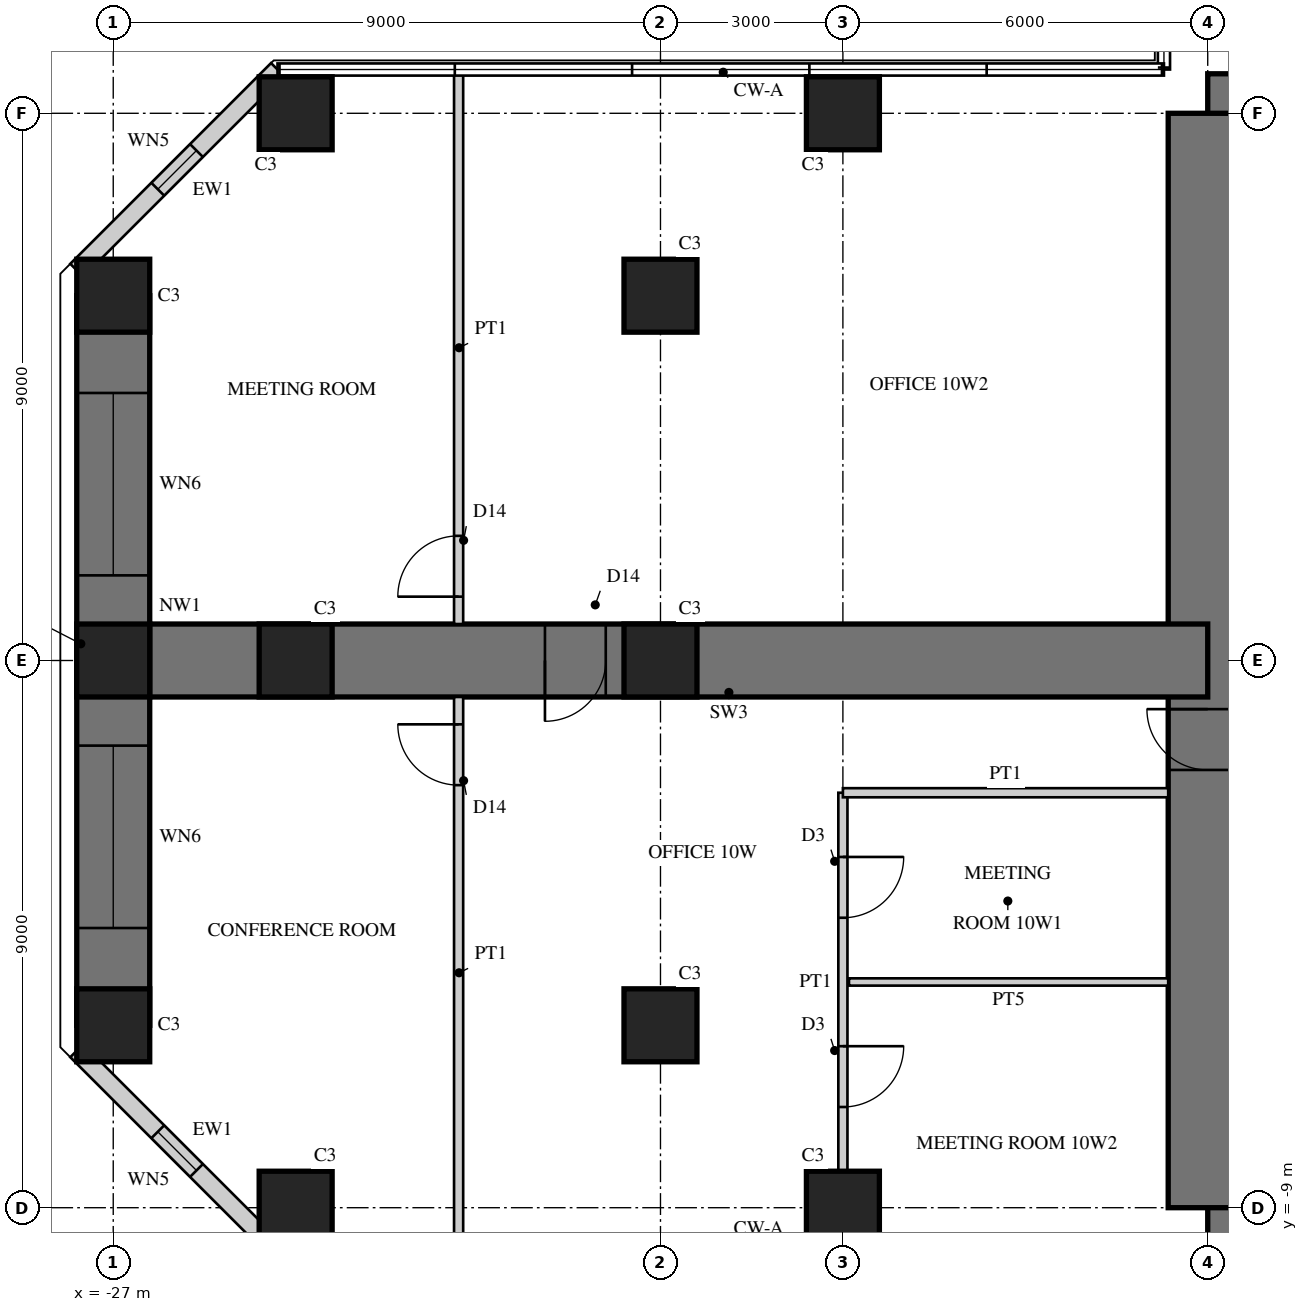
"""IFC4 building model, lengths in metres.
Left out: names, types, materials, properties, quantities, classifications, styles, units other than length and angle.
Written with IfcOpenShell. Run it as: python <this file> out.ifc"""

import sys

from ifc_helpers import new_model, si_unit, direction, frame, frame_2d, origin, origin_2d, place, context, subcontext, project, spatial, rectangle, hollow_rectangle, extrude, element, fill, save


model = new_model("IFC4")
c1 = context("Model", 3, precision=1e-05, world=origin(), true_north=direction((0.0, 1.0)))
c2 = subcontext(c1, "Body", "Model", "MODEL_VIEW")
j1 = project(units=[si_unit("LENGTHUNIT", "METRE"), si_unit("PLANEANGLEUNIT", "RADIAN")], contexts=[c1])
p1 = place(None, origin())
s1 = spatial("IfcSite", under=j1, at=p1, CompositionType="ELEMENT")
p2 = place(p1, origin())
s2 = spatial("IfcBuilding", under=s1, at=p2, CompositionType="ELEMENT")
p3 = place(p2, frame((0.0, 0.0, 43.5)))
s3 = spatial("IfcBuildingStorey", under=s2, at=p3, CompositionType="ELEMENT", Elevation=43.5)
p4 = place(p3, frame((9.0, 9.0, 0.0), z_axis=(0.0, 0.0, 1.0), x_axis=(-1.0, 0.0, 0.0)))
e1 = element("IfcWall", 1, at=p4, inside=s3, PredefinedType="SHEAR", context=c2, shape_type="SweptSolid", body=[
    extrude(rectangle(XDim=18.0, YDim=1.3, at=frame_2d((9.0, 0.0))), origin(), (0.0, 0.0, 1.0), 4.0),
])
p5 = place(p4, frame((9.8, 0.0, 0.0)))
e2 = element("IfcOpeningElement", 2, at=p5, cuts=e1, PredefinedType="OPENING", context=c2, shape_type="SweptSolid", body=[
    extrude(rectangle(XDim=1.0, YDim=2.4, at=frame_2d((0.5, 1.2))), frame((0.0, 0.66, 0.0), z_axis=(0.0, -1.0, 0.0), x_axis=(1.0, 0.0, 0.0)), (0.0, 0.0, 1.0), 1.32),
])
p6 = place(p3, frame((-9.0, -9.0, 0.0), z_axis=(0.0, 0.0, 1.0), x_axis=(1.0, 0.0, 0.0)))
e3 = element("IfcWall", 3, at=p6, inside=s3, PredefinedType="SHEAR", context=c2, shape_type="SweptSolid", body=[
    extrude(rectangle(XDim=18.0, YDim=1.3, at=frame_2d((9.0, 0.0))), origin(), (0.0, 0.0, 1.0), 4.0),
])
p7 = place(p6, frame((9.8, 0.0, 0.0)))
e4 = element("IfcOpeningElement", 4, at=p7, cuts=e3, PredefinedType="OPENING", context=c2, shape_type="SweptSolid", body=[
    extrude(rectangle(XDim=1.0, YDim=2.4, at=frame_2d((0.5, 1.2))), frame((0.0, 0.66, 0.0), z_axis=(0.0, -1.0, 0.0), x_axis=(1.0, 0.0, 0.0)), (0.0, 0.0, 1.0), 1.32),
])
p8 = place(p3, frame((-9.0, 9.0, 0.0), z_axis=(0.0, 0.0, 1.0), x_axis=(0.0, -1.0, 0.0)))
e5 = element("IfcWall", 5, at=p8, inside=s3, PredefinedType="SHEAR", context=c2, shape_type="SweptSolid", body=[
    extrude(rectangle(XDim=18.0, YDim=1.3, at=frame_2d((9.0, 0.0))), origin(), (0.0, 0.0, 1.0), 4.0),
])
p9 = place(p8, frame((9.8, 0.0, 0.0)))
e6 = element("IfcOpeningElement", 6, at=p9, cuts=e5, PredefinedType="OPENING", context=c2, shape_type="SweptSolid", body=[
    extrude(rectangle(XDim=1.0, YDim=2.4, at=frame_2d((0.5, 1.2))), frame((0.0, 0.66, 0.0), z_axis=(0.0, -1.0, 0.0), x_axis=(1.0, 0.0, 0.0)), (0.0, 0.0, 1.0), 1.32),
])
p10 = place(p3, frame((-9.0, 0.0, 0.0), z_axis=(0.0, 0.0, 1.0), x_axis=(-1.0, 0.0, 0.0)))
e7 = element("IfcWall", 7, at=p10, inside=s3, PredefinedType="SHEAR", context=c2, shape_type="SweptSolid", body=[
    extrude(rectangle(XDim=18.0, YDim=1.2, at=frame_2d((9.0, 0.0))), origin(), (0.0, 0.0, 1.0), 4.0),
])
p11 = place(p10, frame((9.9, 0.0, 0.0)))
e8 = element("IfcOpeningElement", 8, at=p11, cuts=e7, PredefinedType="OPENING", context=c2, shape_type="SweptSolid", body=[
    extrude(rectangle(XDim=1.0, YDim=2.2, at=frame_2d((0.5, 1.1))), frame((0.0, 0.61, 0.0), z_axis=(0.0, -1.0, 0.0), x_axis=(1.0, 0.0, 0.0)), (0.0, 0.0, 1.0), 1.22),
])
p12 = place(p3, frame((-27.0, 6.0, 0.0), z_axis=(0.0, 0.0, 1.0), x_axis=(0.0, -1.0, 0.0)))
e9 = element("IfcWall", 9, at=p12, inside=s3, PredefinedType="SHEAR", context=c2, shape_type="SweptSolid", body=[
    extrude(rectangle(XDim=12.0, YDim=1.2, at=frame_2d((6.0, 0.0))), origin(), (0.0, 0.0, 1.0), 4.0),
])
p13 = place(p12, frame((1.6, 0.0, 0.6)))
e10 = element("IfcOpeningElement", 10, at=p13, cuts=e9, PredefinedType="OPENING", context=c2, shape_type="SweptSolid", body=[
    extrude(rectangle(XDim=3.0, YDim=2.4, at=frame_2d((1.5, 1.2))), frame((0.0, 0.61, 0.0), z_axis=(0.0, -1.0, 0.0), x_axis=(1.0, 0.0, 0.0)), (0.0, 0.0, 1.0), 1.22),
])
p14 = place(p12, frame((7.4, 0.0, 0.6)))
e11 = element("IfcOpeningElement", 11, at=p14, cuts=e9, PredefinedType="OPENING", context=c2, shape_type="SweptSolid", body=[
    extrude(rectangle(XDim=3.0, YDim=2.4, at=frame_2d((1.5, 1.2))), frame((0.0, 0.61, 0.0), z_axis=(0.0, -1.0, 0.0), x_axis=(1.0, 0.0, 0.0)), (0.0, 0.0, 1.0), 1.22),
])
for number, where, z_axis, x_axis in (
    (12, (-15.0, 9.0, 0.0), (0.0, 0.0, 1.0), (1.0, 0.0, 0.0)),
    (13, (-24.0, 9.0, 0.0), (0.0, 0.0, 1.0), (1.0, 0.0, 0.0)),
    (14, (-15.0, -9.0, 0.0), (0.0, 0.0, 1.0), (1.0, 0.0, 0.0)),
    (15, (-24.0, -9.0, 0.0), (0.0, 0.0, 1.0), (1.0, 0.0, 0.0)),
    (16, (-27.0, 6.0, 0.0), (0.0, 0.0, 1.0), (1.0, 0.0, 0.0)),
    (17, (-27.0, 0.0, 0.0), (0.0, 0.0, 1.0), (1.0, 0.0, 0.0)),
    (18, (-27.0, -6.0, 0.0), (0.0, 0.0, 1.0), (1.0, 0.0, 0.0)),
    (19, (-18.0, 6.0, 0.0), (0.0, 0.0, 1.0), (1.0, 0.0, 0.0)),
    (20, (-18.0, 0.0, 0.0), (0.0, 0.0, 1.0), (1.0, 0.0, 0.0)),
    (21, (-18.0, -6.0, 0.0), (0.0, 0.0, 1.0), (1.0, 0.0, 0.0)),
    (22, (-24.0, 0.0, 0.0), (0.0, 0.0, 1.0), (1.0, 0.0, 0.0)),
):
    element("IfcColumn", number, at=place(p3, frame(where, z_axis=z_axis, x_axis=x_axis)), inside=s3, PredefinedType="COLUMN", context=c2, shape_type="SweptSolid", body=[
        extrude(rectangle(XDim=1.2, YDim=1.2, at=origin_2d()), origin(), (0.0, 0.0, 1.0), 4.0),
    ])
p15 = place(p3, frame((-24.298, 9.72, 0.0), z_axis=(0.0, 0.0, 1.0), x_axis=(-0.707106781187, -0.707106781187, 0.0)))
e23 = element("IfcWall", 23, at=p15, inside=s3, PredefinedType="SOLIDWALL", context=c2, shape_type="SweptSolid", body=[
    extrude(rectangle(XDim=4.669, YDim=0.3, at=frame_2d((2.335, 0.0))), origin(), (0.0, 0.0, 1.0), 3.8),
])
p16 = place(p15, frame((1.885, 0.0, 0.3)))
e24 = element("IfcOpeningElement", 24, at=p16, cuts=e23, PredefinedType="OPENING", context=c2, shape_type="SweptSolid", body=[
    extrude(rectangle(XDim=0.9, YDim=2.4, at=frame_2d((0.45, 1.2))), frame((0.0, 0.16, 0.0), z_axis=(0.0, -1.0, 0.0), x_axis=(1.0, 0.0, 0.0)), (0.0, 0.0, 1.0), 0.32),
])
p17 = place(p3, frame((-27.6, -6.418, 0.0), z_axis=(0.0, 0.0, 1.0), x_axis=(0.707106781187, -0.707106781187, 0.0)))
e25 = element("IfcWall", 25, at=p17, inside=s3, PredefinedType="SOLIDWALL", context=c2, shape_type="SweptSolid", body=[
    extrude(rectangle(XDim=4.669, YDim=0.3, at=frame_2d((2.335, 0.0))), origin(), (0.0, 0.0, 1.0), 3.8),
])
p18 = place(p17, frame((1.885, 0.0, 0.3)))
e26 = element("IfcOpeningElement", 26, at=p18, cuts=e25, PredefinedType="OPENING", context=c2, shape_type="SweptSolid", body=[
    extrude(rectangle(XDim=0.9, YDim=2.4, at=frame_2d((0.45, 1.2))), frame((0.0, 0.16, 0.0), z_axis=(0.0, -1.0, 0.0), x_axis=(1.0, 0.0, 0.0)), (0.0, 0.0, 1.0), 0.32),
])
p19 = place(p3, frame((-15.0, -2.175, 0.0), z_axis=(0.0, 0.0, 1.0), x_axis=(0.0, -1.0, 0.0)))
e27 = element("IfcWall", 27, at=p19, inside=s3, PredefinedType="PARTITIONING", context=c2, shape_type="SweptSolid", body=[
    extrude(rectangle(XDim=6.225, YDim=0.15, at=frame_2d((3.112, 0.0))), origin(), (0.0, 0.0, 1.0), 2.95),
])
p20 = place(p19, frame((1.056, 0.0, 0.0)))
e28 = element("IfcOpeningElement", 28, at=p20, cuts=e27, PredefinedType="OPENING", context=c2, shape_type="SweptSolid", body=[
    extrude(rectangle(XDim=1.0, YDim=2.1, at=frame_2d((0.5, 1.05))), frame((0.0, 0.085, 0.0), z_axis=(0.0, -1.0, 0.0), x_axis=(1.0, 0.0, 0.0)), (0.0, 0.0, 1.0), 0.17),
])
p21 = place(p19, frame((4.169, 0.0, 0.0)))
e29 = element("IfcOpeningElement", 29, at=p21, cuts=e27, PredefinedType="OPENING", context=c2, shape_type="SweptSolid", body=[
    extrude(rectangle(XDim=1.0, YDim=2.1, at=frame_2d((0.5, 1.05))), frame((0.0, 0.085, 0.0), z_axis=(0.0, -1.0, 0.0), x_axis=(1.0, 0.0, 0.0)), (0.0, 0.0, 1.0), 0.17),
])
p22 = place(p3, frame((-9.65, -2.175, 0.0), z_axis=(0.0, 0.0, 1.0), x_axis=(-1.0, 0.0, 0.0)))
e30 = element("IfcWall", 30, at=p22, inside=s3, PredefinedType="PARTITIONING", context=c2, shape_type="SweptSolid", body=[
    extrude(rectangle(XDim=5.35, YDim=0.15, at=frame_2d((2.675, 0.0))), origin(), (0.0, 0.0, 1.0), 3.8),
])
p23 = place(p3, frame((-9.65, -5.288, 0.0), z_axis=(0.0, 0.0, 1.0), x_axis=(-1.0, 0.0, 0.0)))
e31 = element("IfcWall", 31, at=p23, inside=s3, PredefinedType="PLUMBINGWALL", context=c2, shape_type="SweptSolid", body=[
    extrude(rectangle(XDim=5.25, YDim=0.12, at=frame_2d((2.625, 0.0))), origin(), (0.0, 0.0, 1.0), 3.8),
])
p24 = place(p3, frame((-21.32, -0.6, 0.0), z_axis=(0.0, 0.0, 1.0), x_axis=(0.0, -1.0, 0.0)))
e32 = element("IfcWall", 32, at=p24, inside=s3, PredefinedType="PARTITIONING", context=c2, shape_type="SweptSolid", body=[
    extrude(rectangle(XDim=9.08, YDim=0.15, at=frame_2d((4.54, 0.0))), origin(), (0.0, 0.0, 1.0), 3.8),
])
p25 = place(p24, frame((0.45, 0.0, 0.0)))
e33 = element("IfcOpeningElement", 33, at=p25, cuts=e32, PredefinedType="OPENING", context=c2, shape_type="SweptSolid", body=[
    extrude(rectangle(XDim=1.0, YDim=2.2, at=frame_2d((0.5, 1.1))), frame((0.0, 0.085, 0.0), z_axis=(0.0, -1.0, 0.0), x_axis=(1.0, 0.0, 0.0)), (0.0, 0.0, 1.0), 0.17),
])
p26 = place(p3, frame((-21.32, 9.68, 0.0), z_axis=(0.0, 0.0, 1.0), x_axis=(0.0, -1.0, 0.0)))
e34 = element("IfcWall", 34, at=p26, inside=s3, PredefinedType="PARTITIONING", context=c2, shape_type="SweptSolid", body=[
    extrude(rectangle(XDim=9.08, YDim=0.15, at=frame_2d((4.54, 0.0))), origin(), (0.0, 0.0, 1.0), 3.8),
])
p27 = place(p26, frame((7.63, 0.0, 0.0)))
e35 = element("IfcOpeningElement", 35, at=p27, cuts=e34, PredefinedType="OPENING", context=c2, shape_type="SweptSolid", body=[
    extrude(rectangle(XDim=1.0, YDim=2.2, at=frame_2d((0.5, 1.1))), frame((0.0, 0.085, 0.0), z_axis=(0.0, -1.0, 0.0), x_axis=(1.0, 0.0, 0.0)), (0.0, 0.0, 1.0), 0.17),
])
p28 = place(p16, origin())
e36 = element("IfcWindow", 36, at=p28, inside=s3, PartitioningType="SINGLE_PANEL", PredefinedType="WINDOW", context=c2, shape_type="SweptSolid", body=[
    extrude(hollow_rectangle(XDim=0.9, YDim=2.4, WallThickness=0.06, at=frame_2d((0.45, 1.2))), frame((0.0, 0.03, 0.0), z_axis=(0.0, -1.0, 0.0), x_axis=(1.0, 0.0, 0.0)), (0.0, 0.0, 1.0), 0.06),
    extrude(rectangle(XDim=0.779, YDim=2.279, at=frame_2d((0.45, 1.2))), frame((0.0, 0.03, 0.0), z_axis=(0.0, -1.0, 0.0), x_axis=(1.0, 0.0, 0.0)), (0.0, 0.0, 1.0), 0.06),
])
fill(e24, e36)
p29 = place(p13, origin())
e37 = element("IfcWindow", 37, at=p29, inside=s3, PartitioningType="SINGLE_PANEL", PredefinedType="WINDOW", context=c2, shape_type="SweptSolid", body=[
    extrude(hollow_rectangle(XDim=3.0, YDim=2.4, WallThickness=0.06, at=frame_2d((1.5, 1.2))), frame((0.0, 0.03, 0.0), z_axis=(0.0, -1.0, 0.0), x_axis=(1.0, 0.0, 0.0)), (0.0, 0.0, 1.0), 0.06),
    extrude(rectangle(XDim=2.879, YDim=2.279, at=frame_2d((1.5, 1.2))), frame((0.0, 0.03, 0.0), z_axis=(0.0, -1.0, 0.0), x_axis=(1.0, 0.0, 0.0)), (0.0, 0.0, 1.0), 0.06),
])
fill(e10, e37)
p30 = place(p14, origin())
e38 = element("IfcWindow", 38, at=p30, inside=s3, PartitioningType="SINGLE_PANEL", PredefinedType="WINDOW", context=c2, shape_type="SweptSolid", body=[
    extrude(hollow_rectangle(XDim=3.0, YDim=2.4, WallThickness=0.06, at=frame_2d((1.5, 1.2))), frame((0.0, 0.03, 0.0), z_axis=(0.0, -1.0, 0.0), x_axis=(1.0, 0.0, 0.0)), (0.0, 0.0, 1.0), 0.06),
    extrude(rectangle(XDim=2.879, YDim=2.279, at=frame_2d((1.5, 1.2))), frame((0.0, 0.03, 0.0), z_axis=(0.0, -1.0, 0.0), x_axis=(1.0, 0.0, 0.0)), (0.0, 0.0, 1.0), 0.06),
])
fill(e11, e38)
p31 = place(p18, origin())
e39 = element("IfcWindow", 39, at=p31, inside=s3, PartitioningType="SINGLE_PANEL", PredefinedType="WINDOW", context=c2, shape_type="SweptSolid", body=[
    extrude(hollow_rectangle(XDim=0.9, YDim=2.4, WallThickness=0.06, at=frame_2d((0.45, 1.2))), frame((0.0, 0.03, 0.0), z_axis=(0.0, -1.0, 0.0), x_axis=(1.0, 0.0, 0.0)), (0.0, 0.0, 1.0), 0.06),
    extrude(rectangle(XDim=0.779, YDim=2.279, at=frame_2d((0.45, 1.2))), frame((0.0, 0.03, 0.0), z_axis=(0.0, -1.0, 0.0), x_axis=(1.0, 0.0, 0.0)), (0.0, 0.0, 1.0), 0.06),
])
fill(e26, e39)
p32 = place(p20, origin())
e40 = element("IfcDoor", 40, at=p32, inside=s3, OperationType="SINGLE_SWING_LEFT", PredefinedType="DOOR", context=c2, shape_type="SweptSolid", body=[
    extrude(rectangle(XDim=1.0, YDim=2.1, at=frame_2d((0.5, 1.05))), frame((0.0, 0.025, 0.0), z_axis=(0.0, -1.0, 0.0), x_axis=(1.0, 0.0, 0.0)), (0.0, 0.0, 1.0), 0.05),
])
fill(e28, e40)
p33 = place(p21, origin())
e41 = element("IfcDoor", 41, at=p33, inside=s3, OperationType="SINGLE_SWING_LEFT", PredefinedType="DOOR", context=c2, shape_type="SweptSolid", body=[
    extrude(rectangle(XDim=1.0, YDim=2.1, at=frame_2d((0.5, 1.05))), frame((0.0, 0.025, 0.0), z_axis=(0.0, -1.0, 0.0), x_axis=(1.0, 0.0, 0.0)), (0.0, 0.0, 1.0), 0.05),
])
fill(e29, e41)
p34 = place(p25, frame((1.0, 0.0, 0.0), z_axis=(0.0, 0.0, 1.0), x_axis=(-1.0, 0.0, 0.0)))
e42 = element("IfcDoor", 42, at=p34, inside=s3, OperationType="SINGLE_SWING_RIGHT", PredefinedType="DOOR", context=c2, shape_type="SweptSolid", body=[
    extrude(rectangle(XDim=1.0, YDim=2.2, at=frame_2d((0.5, 1.1))), frame((0.0, 0.025, 0.0), z_axis=(0.0, -1.0, 0.0), x_axis=(1.0, 0.0, 0.0)), (0.0, 0.0, 1.0), 0.05),
])
fill(e33, e42)
p35 = place(p27, frame((1.0, 0.0, 0.0), z_axis=(0.0, 0.0, 1.0), x_axis=(-1.0, 0.0, 0.0)))
e43 = element("IfcDoor", 43, at=p35, inside=s3, OperationType="SINGLE_SWING_LEFT", PredefinedType="DOOR", context=c2, shape_type="SweptSolid", body=[
    extrude(rectangle(XDim=1.0, YDim=2.2, at=frame_2d((0.5, 1.1))), frame((0.0, 0.025, 0.0), z_axis=(0.0, -1.0, 0.0), x_axis=(1.0, 0.0, 0.0)), (0.0, 0.0, 1.0), 0.05),
])
fill(e35, e43)
p36 = place(p11, origin())
e44 = element("IfcDoor", 44, at=p36, inside=s3, OperationType="SINGLE_SWING_RIGHT", PredefinedType="DOOR", context=c2, shape_type="SweptSolid", body=[
    extrude(rectangle(XDim=1.0, YDim=2.2, at=frame_2d((0.5, 1.1))), frame((0.0, 0.025, 0.0), z_axis=(0.0, -1.0, 0.0), x_axis=(1.0, 0.0, 0.0)), (0.0, 0.0, 1.0), 0.05),
])
fill(e8, e44)
p37 = place(p9, frame((1.0, 0.0, 0.0), z_axis=(0.0, 0.0, 1.0), x_axis=(-1.0, 0.0, 0.0)))
e45 = element("IfcDoor", 45, at=p37, inside=s3, OperationType="SINGLE_SWING_RIGHT", PredefinedType="DOOR", context=c2, shape_type="SweptSolid", body=[
    extrude(rectangle(XDim=1.0, YDim=2.4, at=frame_2d((0.5, 1.2))), frame((0.0, -0.005, 0.0), z_axis=(0.0, -1.0, 0.0), x_axis=(1.0, 0.0, 0.0)), (0.0, 0.0, 1.0), 0.05),
])
fill(e6, e45)
save(model, sys.argv[1])
